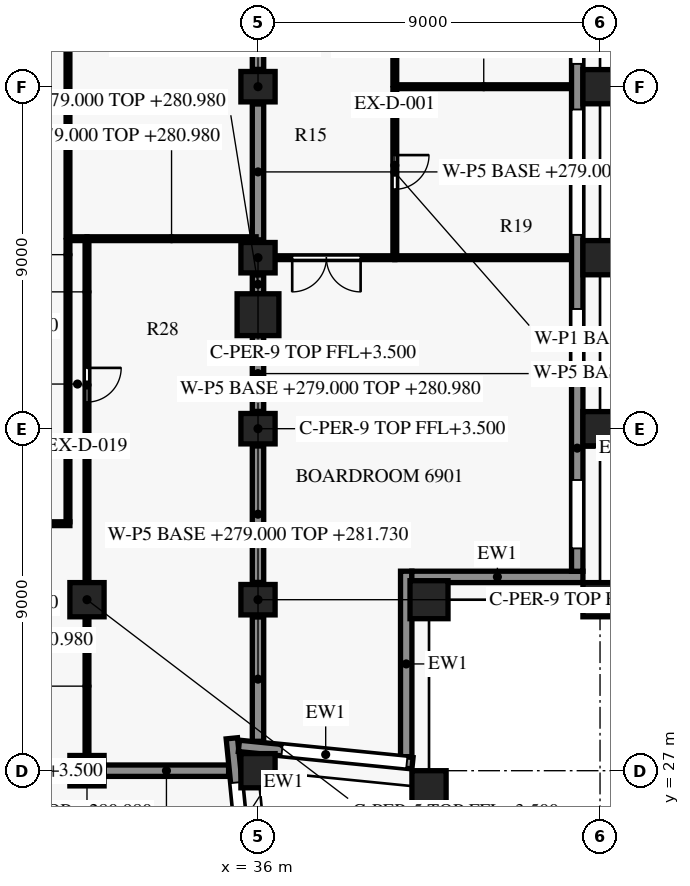
"""IFC4 building model, lengths in metres.
Left out: names, types, materials, properties, quantities, classifications, styles, units other than length and angle.
Written with IfcOpenShell. Run it as: python <this file> out.ifc"""

import sys

from ifc_helpers import new_model, si_unit, direction, frame, frame_2d, origin, origin_2d, place, context, subcontext, project, spatial, rectangle, extrude, element, fill, save


model = new_model("IFC4")
c1 = context("Model", 3, precision=1e-05, world=origin(), true_north=direction((0.0, 1.0)))
c2 = subcontext(c1, "Body", "Model", "MODEL_VIEW")
j1 = project(units=[si_unit("LENGTHUNIT", "METRE"), si_unit("PLANEANGLEUNIT", "RADIAN")], contexts=[c1])
p1 = place(None, origin())
s1 = spatial("IfcSite", under=j1, at=p1, CompositionType="ELEMENT")
p2 = place(p1, origin())
s2 = spatial("IfcBuilding", under=s1, at=p2, CompositionType="ELEMENT")
p3 = place(p2, frame((0.0, 0.0, 279.0)))
s3 = spatial("IfcBuildingStorey", under=s2, at=p3, CompositionType="ELEMENT", Elevation=279.0)
for number, where, z_axis, x_axis in (
    (1, (36.0, 27.0, 0.0), (0.0, 0.0, 1.0), (-0.1, 0.995, 0.0)),
    (2, (40.5, 26.55, 0.0), (0.0, 0.0, 1.0), (0.995, -0.1, 0.0)),
    (3, (45.0, 31.5, 0.0), (0.0, 0.0, 1.0), (0.0, 1.0, 0.0)),
    (4, (45.0, 36.0, 0.0), (0.0, 0.0, 1.0), (0.0, 1.0, 0.0)),
    (5, (45.0, 40.5, 0.0), (0.0, 0.0, 1.0), (0.0, 1.0, 0.0)),
    (6, (45.0, 45.0, 0.0), (0.0, 0.0, 1.0), (0.0, 1.0, 0.0)),
):
    element("IfcColumn", number, at=place(p3, frame(where, z_axis=z_axis, x_axis=x_axis)), inside=s3, PredefinedType="COLUMN", context=c2, shape_type="SweptSolid", body=[
        extrude(rectangle(XDim=0.9, YDim=0.9, at=origin_2d()), origin(), (0.0, 0.0, 1.0), 3.8),
    ])
p4 = place(p3, frame((40.5, 31.5, 0.0), z_axis=(0.0, 0.0, 1.0), x_axis=(1.0, 0.0, 0.0)))
e7 = element("IfcColumn", 7, at=p4, inside=s3, PredefinedType="COLUMN", context=c2, shape_type="SweptSolid", body=[
    extrude(rectangle(XDim=1.0, YDim=1.0, at=origin_2d()), origin(), (0.0, 0.0, 1.0), 3.8),
])
p5 = place(p3, frame((36.0, 39.0, 0.0), z_axis=(0.0, 0.0, 1.0), x_axis=(1.0, 0.0, 0.0)))
e8 = element("IfcColumn", 8, at=p5, inside=s3, PredefinedType="COLUMN", context=c2, shape_type="SweptSolid", body=[
    extrude(rectangle(XDim=1.1, YDim=1.1, at=origin_2d()), origin(), (0.0, 0.0, 1.0), 3.8),
])
p6 = place(p3, frame((35.312, 27.852, 0.0), z_axis=(0.0, 0.0, 1.0), x_axis=(0.099503719021, -0.99503719021, 0.0)))
e9 = element("IfcWall", 9, at=p6, inside=s3, PredefinedType="SOLIDWALL", context=c2, shape_type="SweptSolid", body=[
    extrude(rectangle(XDim=4.62, YDim=0.3, at=frame_2d((2.31, 0.0))), origin(), (0.0, 0.0, 1.0), 3.15),
])
p7 = place(p6, frame((1.17, 0.0, 0.15)))
e10 = element("IfcOpeningElement", 10, at=p7, cuts=e9, PredefinedType="OPENING", context=c2, shape_type="SweptSolid", body=[
    extrude(rectangle(XDim=3.3, YDim=2.4, at=frame_2d((1.65, 1.2))), frame((0.0, 0.16, 0.0), z_axis=(0.0, -1.0, 0.0), x_axis=(1.0, 0.0, 0.0)), (0.0, 0.0, 1.0), 0.32),
])
p8 = place(p3, frame((40.065, 27.197, 0.0), z_axis=(0.0, 0.0, 1.0), x_axis=(-0.995036663613, 0.099508984853, 0.0)))
e11 = element("IfcWall", 11, at=p8, inside=s3, PredefinedType="SOLIDWALL", context=c2, shape_type="SweptSolid", body=[
    extrude(rectangle(XDim=4.59, YDim=0.3, at=frame_2d((2.295, 0.0))), origin(), (0.0, 0.0, 1.0), 3.15),
])
p9 = place(p8, frame((0.15, 0.0, 0.15)))
e12 = element("IfcOpeningElement", 12, at=p9, cuts=e11, PredefinedType="OPENING", context=c2, shape_type="SweptSolid", body=[
    extrude(rectangle(XDim=3.3, YDim=2.4, at=frame_2d((1.65, 1.2))), frame((0.0, 0.16, 0.0), z_axis=(0.0, -1.0, 0.0), x_axis=(1.0, 0.0, 0.0)), (0.0, 0.0, 1.0), 0.32),
])
p10 = place(p3, frame((39.9, 32.25, 0.0), z_axis=(0.0, 0.0, 1.0), x_axis=(0.0, -1.0, 0.0)))
e13 = element("IfcWall", 13, at=p10, inside=s3, PredefinedType="SOLIDWALL", context=c2, shape_type="SweptSolid", body=[
    extrude(rectangle(XDim=4.881, YDim=0.3, at=frame_2d((2.44, 0.0))), origin(), (0.0, 0.0, 1.0), 3.15),
])
p11 = place(p3, frame((44.55, 32.1, 0.0), z_axis=(0.0, 0.0, 1.0), x_axis=(-1.0, 0.0, 0.0)))
e14 = element("IfcWall", 14, at=p11, inside=s3, PredefinedType="SOLIDWALL", context=c2, shape_type="SweptSolid", body=[
    extrude(rectangle(XDim=4.502, YDim=0.3, at=frame_2d((2.251, 0.0))), origin(), (0.0, 0.0, 1.0), 3.15),
])
p12 = place(p3, frame((44.4, 53.85, 0.0), z_axis=(0.0, 0.0, 1.0), x_axis=(0.0, -1.0, 0.0)))
e15 = element("IfcWall", 15, at=p12, inside=s3, PredefinedType="SOLIDWALL", context=c2, shape_type="SweptSolid", body=[
    extrude(rectangle(XDim=21.602, YDim=0.3, at=frame_2d((10.801, 0.0))), origin(), (0.0, 0.0, 1.0), 3.15),
])
p13 = place(p12, frame((1.2, 0.0, 0.75)))
e16 = element("IfcOpeningElement", 16, at=p13, cuts=e15, PredefinedType="OPENING", context=c2, shape_type="SweptSolid", body=[
    extrude(rectangle(XDim=1.8, YDim=1.8, at=frame_2d((0.9, 0.9))), frame((0.0, 0.16, 0.0), z_axis=(0.0, -1.0, 0.0), x_axis=(1.0, 0.0, 0.0)), (0.0, 0.0, 1.0), 0.32),
])
p14 = place(p12, frame((4.95, 0.0, 0.15)))
e17 = element("IfcOpeningElement", 17, at=p14, cuts=e15, PredefinedType="OPENING", context=c2, shape_type="SweptSolid", body=[
    extrude(rectangle(XDim=3.3, YDim=2.4, at=frame_2d((1.65, 1.2))), frame((0.0, 0.16, 0.0), z_axis=(0.0, -1.0, 0.0), x_axis=(1.0, 0.0, 0.0)), (0.0, 0.0, 1.0), 0.32),
])
p15 = place(p12, frame((9.45, 0.0, 0.15)))
e18 = element("IfcOpeningElement", 18, at=p15, cuts=e15, PredefinedType="OPENING", context=c2, shape_type="SweptSolid", body=[
    extrude(rectangle(XDim=3.3, YDim=2.4, at=frame_2d((1.65, 1.2))), frame((0.0, 0.16, 0.0), z_axis=(0.0, -1.0, 0.0), x_axis=(1.0, 0.0, 0.0)), (0.0, 0.0, 1.0), 0.32),
])
p16 = place(p12, frame((14.7, 0.0, 0.75)))
e19 = element("IfcOpeningElement", 19, at=p16, cuts=e15, PredefinedType="OPENING", context=c2, shape_type="SweptSolid", body=[
    extrude(rectangle(XDim=1.8, YDim=1.8, at=frame_2d((0.9, 0.9))), frame((0.0, 0.16, 0.0), z_axis=(0.0, -1.0, 0.0), x_axis=(1.0, 0.0, 0.0)), (0.0, 0.0, 1.0), 0.32),
])
p17 = place(p12, frame((19.2, 0.0, 0.75)))
e20 = element("IfcOpeningElement", 20, at=p17, cuts=e15, PredefinedType="OPENING", context=c2, shape_type="SweptSolid", body=[
    extrude(rectangle(XDim=1.8, YDim=1.8, at=frame_2d((0.9, 0.9))), frame((0.0, 0.16, 0.0), z_axis=(0.0, -1.0, 0.0), x_axis=(1.0, 0.0, 0.0)), (0.0, 0.0, 1.0), 0.32),
])
p18 = place(p3, frame((27.455, 27.0, 0.0), z_axis=(0.0, 0.0, 1.0), x_axis=(1.0, 0.0, 0.0)))
e21 = element("IfcWall", 21, at=p18, inside=s3, PredefinedType="PARTITIONING", context=c2, shape_type="SweptSolid", body=[
    extrude(rectangle(XDim=3.59, YDim=0.3, at=frame_2d((1.795, 0.0))), origin(), (0.0, 0.0, 1.0), 1.98),
])
for number, where, z_axis, x_axis in (
    (22, (31.955, 27.0, 0.0), (0.0, 0.0, 1.0), (1.0, 0.0, 0.0)),
    (23, (36.0, 27.774, 0.0), (0.0, 0.0, 1.0), (0.0, 1.0, 0.0)),
):
    element("IfcWall", number, at=place(p3, frame(where, z_axis=z_axis, x_axis=x_axis)), inside=s3, PredefinedType="PARTITIONING", context=c2, shape_type="SweptSolid", body=[
        extrude(rectangle(XDim=3.271, YDim=0.3, at=frame_2d((1.636, 0.0))), origin(), (0.0, 0.0, 1.0), 2.73),
    ])
p19 = place(p3, frame((31.5, 31.045, 0.0), z_axis=(0.0, 0.0, 1.0), x_axis=(0.0, -1.0, 0.0)))
e24 = element("IfcWall", 24, at=p19, inside=s3, PredefinedType="PARTITIONING", context=c2, shape_type="SweptSolid", body=[
    extrude(rectangle(XDim=3.64, YDim=0.1, at=frame_2d((1.82, 0.0))), origin(), (0.0, 0.0, 1.0), 1.98),
])
p20 = place(p3, frame((36.0, 31.955, 0.0), z_axis=(0.0, 0.0, 1.0), x_axis=(0.0, 1.0, 0.0)))
e25 = element("IfcWall", 25, at=p20, inside=s3, PredefinedType="PARTITIONING", context=c2, shape_type="SweptSolid", body=[
    extrude(rectangle(XDim=3.59, YDim=0.3, at=frame_2d((1.795, 0.0))), origin(), (0.0, 0.0, 1.0), 1.98),
])
p21 = place(p3, frame((31.05, 33.5, 0.0), z_axis=(0.0, 0.0, 1.0), x_axis=(-1.0, 0.0, 0.0)))
e26 = element("IfcWall", 26, at=p21, inside=s3, PredefinedType="PARTITIONING", context=c2, shape_type="SweptSolid", body=[
    extrude(rectangle(XDim=8.55, YDim=0.1, at=frame_2d((4.275, 0.0))), origin(), (0.0, 0.0, 1.0), 1.98),
])
p22 = place(p21, frame((3.688, 0.0, 0.0)))
e27 = element("IfcOpeningElement", 27, at=p22, cuts=e26, PredefinedType="OPENING", context=c2, shape_type="SweptSolid", body=[
    extrude(rectangle(XDim=0.9, YDim=2.1, at=frame_2d((0.45, 1.05))), frame((0.0, 0.06, 0.0), z_axis=(0.0, -1.0, 0.0), x_axis=(1.0, 0.0, 0.0)), (0.0, 0.0, 1.0), 0.12),
])
p23 = place(p3, frame((36.0, 36.455, 0.0), z_axis=(0.0, 0.0, 1.0), x_axis=(0.0, 1.0, 0.0)))
e28 = element("IfcWall", 28, at=p23, inside=s3, PredefinedType="PARTITIONING", context=c2, shape_type="SweptSolid", body=[
    extrude(rectangle(XDim=1.99, YDim=0.3, at=frame_2d((0.995, 0.0))), origin(), (0.0, 0.0, 1.0), 1.98),
])
p24 = place(p3, frame((36.0, 39.555, 0.0), z_axis=(0.0, 0.0, 1.0), x_axis=(0.0, 1.0, 0.0)))
e29 = element("IfcWall", 29, at=p24, inside=s3, PredefinedType="PARTITIONING", context=c2, shape_type="SweptSolid", body=[
    extrude(rectangle(XDim=0.49, YDim=0.3, at=frame_2d((0.245, 0.0))), origin(), (0.0, 0.0, 1.0), 1.98),
])
p25 = place(p3, frame((39.6, 40.5, 0.0), z_axis=(0.0, 0.0, 1.0), x_axis=(-1.0, 0.0, 0.0)))
e30 = element("IfcWall", 30, at=p25, inside=s3, PredefinedType="PARTITIONING", context=c2, shape_type="SweptSolid", body=[
    extrude(rectangle(XDim=3.195, YDim=0.1, at=frame_2d((1.598, 0.0))), origin(), (0.0, 0.0, 1.0), 3.33),
])
p26 = place(p25, frame((0.9, 0.0, 0.0)))
e31 = element("IfcOpeningElement", 31, at=p26, cuts=e30, PredefinedType="OPENING", context=c2, shape_type="SweptSolid", body=[
    extrude(rectangle(XDim=1.8, YDim=2.1, at=frame_2d((0.9, 1.05))), frame((0.0, 0.06, 0.0), z_axis=(0.0, -1.0, 0.0), x_axis=(1.0, 0.0, 0.0)), (0.0, 0.0, 1.0), 0.12),
])
p27 = place(p3, frame((44.23, 40.5, 0.0), z_axis=(0.0, 0.0, 1.0), x_axis=(-1.0, 0.0, 0.0)))
e32 = element("IfcWall", 32, at=p27, inside=s3, PredefinedType="PARTITIONING", context=c2, shape_type="SweptSolid", body=[
    extrude(rectangle(XDim=4.63, YDim=0.1, at=frame_2d((2.315, 0.0))), origin(), (0.0, 0.0, 1.0), 3.33),
])
p28 = place(p3, frame((31.0, 40.95, 0.0), z_axis=(0.0, 0.0, 1.0), x_axis=(0.0, -1.0, 0.0)))
e33 = element("IfcWall", 33, at=p28, inside=s3, PredefinedType="PARTITIONING", context=c2, shape_type="SweptSolid", body=[
    extrude(rectangle(XDim=7.4, YDim=0.1, at=frame_2d((3.7, 0.0))), origin(), (0.0, 0.0, 1.0), 2.98),
])
p29 = place(p3, frame((31.5, 40.95, 0.0), z_axis=(0.0, 0.0, 1.0), x_axis=(0.0, -1.0, 0.0)))
e34 = element("IfcWall", 34, at=p29, inside=s3, PredefinedType="PARTITIONING", context=c2, shape_type="SweptSolid", body=[
    extrude(rectangle(XDim=8.995, YDim=0.1, at=frame_2d((4.498, 0.0))), origin(), (0.0, 0.0, 1.0), 2.98),
])
p30 = place(p29, frame((3.35, 0.0, 0.0)))
e35 = element("IfcOpeningElement", 35, at=p30, cuts=e34, PredefinedType="OPENING", context=c2, shape_type="SweptSolid", body=[
    extrude(rectangle(XDim=0.9, YDim=2.1, at=frame_2d((0.45, 1.05))), frame((0.0, 0.06, 0.0), z_axis=(0.0, -1.0, 0.0), x_axis=(1.0, 0.0, 0.0)), (0.0, 0.0, 1.0), 0.12),
])
p31 = place(p3, frame((31.05, 41.0, 0.0), z_axis=(0.0, 0.0, 1.0), x_axis=(1.0, 0.0, 0.0)))
e36 = element("IfcWall", 36, at=p31, inside=s3, PredefinedType="PARTITIONING", context=c2, shape_type="SweptSolid", body=[
    extrude(rectangle(XDim=0.45, YDim=0.1, at=frame_2d((0.225, 0.0))), origin(), (0.0, 0.0, 1.0), 3.33),
])
p32 = place(p3, frame((35.95, 41.0, 0.0), z_axis=(0.0, 0.0, 1.0), x_axis=(-1.0, 0.0, 0.0)))
e37 = element("IfcWall", 37, at=p32, inside=s3, PredefinedType="PARTITIONING", context=c2, shape_type="SweptSolid", body=[
    extrude(rectangle(XDim=4.45, YDim=0.1, at=frame_2d((2.225, 0.0))), origin(), (0.0, 0.0, 1.0), 1.98),
])
p33 = place(p3, frame((36.0, 40.97, 0.0), z_axis=(0.0, 0.0, 1.0), x_axis=(0.0, 1.0, 0.0)))
e38 = element("IfcWall", 38, at=p33, inside=s3, PredefinedType="PARTITIONING", context=c2, shape_type="SweptSolid", body=[
    extrude(rectangle(XDim=3.575, YDim=0.3, at=frame_2d((1.788, 0.0))), origin(), (0.0, 0.0, 1.0), 1.98),
])
p34 = place(p3, frame((39.6, 44.95, 0.0), z_axis=(0.0, 0.0, 1.0), x_axis=(0.0, -1.0, 0.0)))
e39 = element("IfcWall", 39, at=p34, inside=s3, PredefinedType="PARTITIONING", context=c2, shape_type="SweptSolid", body=[
    extrude(rectangle(XDim=4.4, YDim=0.1, at=frame_2d((2.2, 0.0))), origin(), (0.0, 0.0, 1.0), 2.98),
])
p35 = place(p34, frame((1.75, 0.0, 0.0)))
e40 = element("IfcOpeningElement", 40, at=p35, cuts=e39, PredefinedType="OPENING", context=c2, shape_type="SweptSolid", body=[
    extrude(rectangle(XDim=0.9, YDim=2.1, at=frame_2d((0.45, 1.05))), frame((0.0, 0.06, 0.0), z_axis=(0.0, -1.0, 0.0), x_axis=(1.0, 0.0, 0.0)), (0.0, 0.0, 1.0), 0.12),
])
p36 = place(p3, frame((39.65, 45.0, 0.0), z_axis=(0.0, 0.0, 1.0), x_axis=(1.0, 0.0, 0.0)))
e41 = element("IfcWall", 41, at=p36, inside=s3, PredefinedType="PARTITIONING", context=c2, shape_type="SweptSolid", body=[
    extrude(rectangle(XDim=4.58, YDim=0.1, at=frame_2d((2.29, 0.0))), origin(), (0.0, 0.0, 1.0), 2.98),
])
p37 = place(p3, frame((36.0, 45.455, 0.0), z_axis=(0.0, 0.0, 1.0), x_axis=(0.0, 1.0, 0.0)))
e42 = element("IfcWall", 42, at=p37, inside=s3, PredefinedType="PARTITIONING", context=c2, shape_type="SweptSolid", body=[
    extrude(rectangle(XDim=3.59, YDim=0.3, at=frame_2d((1.795, 0.0))), origin(), (0.0, 0.0, 1.0), 1.98),
])
p38 = place(p3, frame((39.6, 53.7, 0.0), z_axis=(0.0, 0.0, 1.0), x_axis=(0.0, -1.0, 0.0)))
e43 = element("IfcWall", 43, at=p38, inside=s3, PredefinedType="PARTITIONING", context=c2, shape_type="SweptSolid", body=[
    extrude(rectangle(XDim=8.65, YDim=0.1, at=frame_2d((4.325, 0.0))), origin(), (0.0, 0.0, 1.0), 2.73),
])
p39 = place(p38, frame((3.55, 0.0, 0.0)))
e44 = element("IfcOpeningElement", 44, at=p39, cuts=e43, PredefinedType="OPENING", context=c2, shape_type="SweptSolid", body=[
    extrude(rectangle(XDim=1.8, YDim=2.1, at=frame_2d((0.9, 1.05))), frame((0.0, 0.06, 0.0), z_axis=(0.0, -1.0, 0.0), x_axis=(1.0, 0.0, 0.0)), (0.0, 0.0, 1.0), 0.12),
])
p40 = place(p3, frame((31.0, 54.95, 0.0), z_axis=(0.0, 0.0, 1.0), x_axis=(0.0, -1.0, 0.0)))
e45 = element("IfcWall", 45, at=p40, inside=s3, PredefinedType="PARTITIONING", context=c2, shape_type="SweptSolid", body=[
    extrude(rectangle(XDim=13.9, YDim=0.1, at=frame_2d((6.95, 0.0))), origin(), (0.0, 0.0, 1.0), 2.98),
])
p41 = place(p40, frame((6.5, 0.0, 0.0)))
e46 = element("IfcOpeningElement", 46, at=p41, cuts=e45, PredefinedType="OPENING", context=c2, shape_type="SweptSolid", body=[
    extrude(rectangle(XDim=0.9, YDim=2.1, at=frame_2d((0.45, 1.05))), frame((0.0, 0.06, 0.0), z_axis=(0.0, -1.0, 0.0), x_axis=(1.0, 0.0, 0.0)), (0.0, 0.0, 1.0), 0.12),
])
p42 = place(p3, frame((31.5, 27.0, 0.0), z_axis=(0.0, 0.0, 1.0), x_axis=(1.0, 0.0, 0.0)))
e47 = element("IfcColumn", 47, at=p42, inside=s3, PredefinedType="COLUMN", context=c2, shape_type="SweptSolid", body=[
    extrude(rectangle(XDim=0.9, YDim=0.8, at=origin_2d()), origin(), (0.0, 0.0, 1.0), 3.5),
])
p43 = place(p3, frame((31.5, 31.5, 0.0), z_axis=(0.0, 0.0, 1.0), x_axis=(1.0, 0.0, 0.0)))
e48 = element("IfcColumn", 48, at=p43, inside=s3, PredefinedType="COLUMN", context=c2, shape_type="SweptSolid", body=[
    extrude(rectangle(XDim=0.9, YDim=0.9, at=origin_2d()), origin(), (0.0, 0.0, 1.0), 3.5),
])
for number, where, z_axis, x_axis in (
    (49, (36.0, 31.5, 0.0), (0.0, 0.0, 1.0), (0.0, 1.0, 0.0)),
    (50, (36.0, 36.0, 0.0), (0.0, 0.0, 1.0), (0.0, 1.0, 0.0)),
    (51, (36.0, 40.5, 0.0), (0.0, 0.0, 1.0), (0.0, 1.0, 0.0)),
    (52, (36.0, 45.0, 0.0), (0.0, 0.0, 1.0), (0.0, 1.0, 0.0)),
):
    element("IfcColumn", number, at=place(p3, frame(where, z_axis=z_axis, x_axis=x_axis)), inside=s3, PredefinedType="COLUMN", context=c2, shape_type="SweptSolid", body=[
        extrude(rectangle(XDim=0.9, YDim=0.8, at=origin_2d()), origin(), (0.0, 0.0, 1.0), 3.5),
    ])
p44 = place(p7, origin())
e53 = element("IfcWindow", 53, at=p44, inside=s3, PartitioningType="SINGLE_PANEL", PredefinedType="WINDOW", context=c2, shape_type="SweptSolid", body=[
    extrude(rectangle(XDim=3.3, YDim=2.4, at=frame_2d((1.65, 1.2))), frame((0.0, 0.03, 0.0), z_axis=(0.0, -1.0, 0.0), x_axis=(1.0, 0.0, 0.0)), (0.0, 0.0, 1.0), 0.06),
])
fill(e10, e53)
p45 = place(p9, origin())
e54 = element("IfcWindow", 54, at=p45, inside=s3, PartitioningType="SINGLE_PANEL", PredefinedType="WINDOW", context=c2, shape_type="SweptSolid", body=[
    extrude(rectangle(XDim=3.3, YDim=2.4, at=frame_2d((1.65, 1.2))), frame((0.0, 0.03, 0.0), z_axis=(0.0, -1.0, 0.0), x_axis=(1.0, 0.0, 0.0)), (0.0, 0.0, 1.0), 0.06),
])
fill(e12, e54)
p46 = place(p14, origin())
e55 = element("IfcWindow", 55, at=p46, inside=s3, PartitioningType="SINGLE_PANEL", PredefinedType="WINDOW", context=c2, shape_type="SweptSolid", body=[
    extrude(rectangle(XDim=3.3, YDim=2.4, at=frame_2d((1.65, 1.2))), frame((0.0, 0.03, 0.0), z_axis=(0.0, -1.0, 0.0), x_axis=(1.0, 0.0, 0.0)), (0.0, 0.0, 1.0), 0.06),
])
fill(e17, e55)
p47 = place(p15, origin())
e56 = element("IfcWindow", 56, at=p47, inside=s3, PartitioningType="SINGLE_PANEL", PredefinedType="WINDOW", context=c2, shape_type="SweptSolid", body=[
    extrude(rectangle(XDim=3.3, YDim=2.4, at=frame_2d((1.65, 1.2))), frame((0.0, 0.03, 0.0), z_axis=(0.0, -1.0, 0.0), x_axis=(1.0, 0.0, 0.0)), (0.0, 0.0, 1.0), 0.06),
])
fill(e18, e56)
p48 = place(p16, origin())
e57 = element("IfcWindow", 57, at=p48, inside=s3, PartitioningType="SINGLE_PANEL", PredefinedType="WINDOW", context=c2, shape_type="SweptSolid", body=[
    extrude(rectangle(XDim=1.8, YDim=1.8, at=frame_2d((0.9, 0.9))), frame((0.0, 0.03, 0.0), z_axis=(0.0, -1.0, 0.0), x_axis=(1.0, 0.0, 0.0)), (0.0, 0.0, 1.0), 0.06),
])
fill(e19, e57)
p49 = place(p17, origin())
e58 = element("IfcWindow", 58, at=p49, inside=s3, PartitioningType="SINGLE_PANEL", PredefinedType="WINDOW", context=c2, shape_type="SweptSolid", body=[
    extrude(rectangle(XDim=1.8, YDim=1.8, at=frame_2d((0.9, 0.9))), frame((0.0, 0.03, 0.0), z_axis=(0.0, -1.0, 0.0), x_axis=(1.0, 0.0, 0.0)), (0.0, 0.0, 1.0), 0.06),
])
fill(e20, e58)
p50 = place(p35, origin())
e59 = element("IfcDoor", 59, at=p50, inside=s3, OperationType="SINGLE_SWING_RIGHT", PredefinedType="DOOR", context=c2, shape_type="SweptSolid", body=[
    extrude(rectangle(XDim=0.9, YDim=2.1, at=frame_2d((0.45, 1.05))), frame((0.0, 0.025, 0.0), z_axis=(0.0, -1.0, 0.0), x_axis=(1.0, 0.0, 0.0)), (0.0, 0.0, 1.0), 0.05),
])
fill(e40, e59)
p51 = place(p26, origin())
e60 = element("IfcDoor", 60, at=p51, inside=s3, OperationType="DOUBLE_DOOR_SINGLE_SWING", PredefinedType="DOOR", context=c2, shape_type="SweptSolid", body=[
    extrude(rectangle(XDim=1.8, YDim=2.1, at=frame_2d((0.9, 1.05))), frame((0.0, 0.025, 0.0), z_axis=(0.0, -1.0, 0.0), x_axis=(1.0, 0.0, 0.0)), (0.0, 0.0, 1.0), 0.05),
])
fill(e31, e60)
p52 = place(p30, origin())
e61 = element("IfcDoor", 61, at=p52, inside=s3, OperationType="SINGLE_SWING_LEFT", PredefinedType="DOOR", context=c2, shape_type="SweptSolid", body=[
    extrude(rectangle(XDim=0.9, YDim=2.1, at=frame_2d((0.45, 1.05))), frame((0.0, 0.025, 0.0), z_axis=(0.0, -1.0, 0.0), x_axis=(1.0, 0.0, 0.0)), (0.0, 0.0, 1.0), 0.05),
])
fill(e35, e61)
save(model, sys.argv[1])
